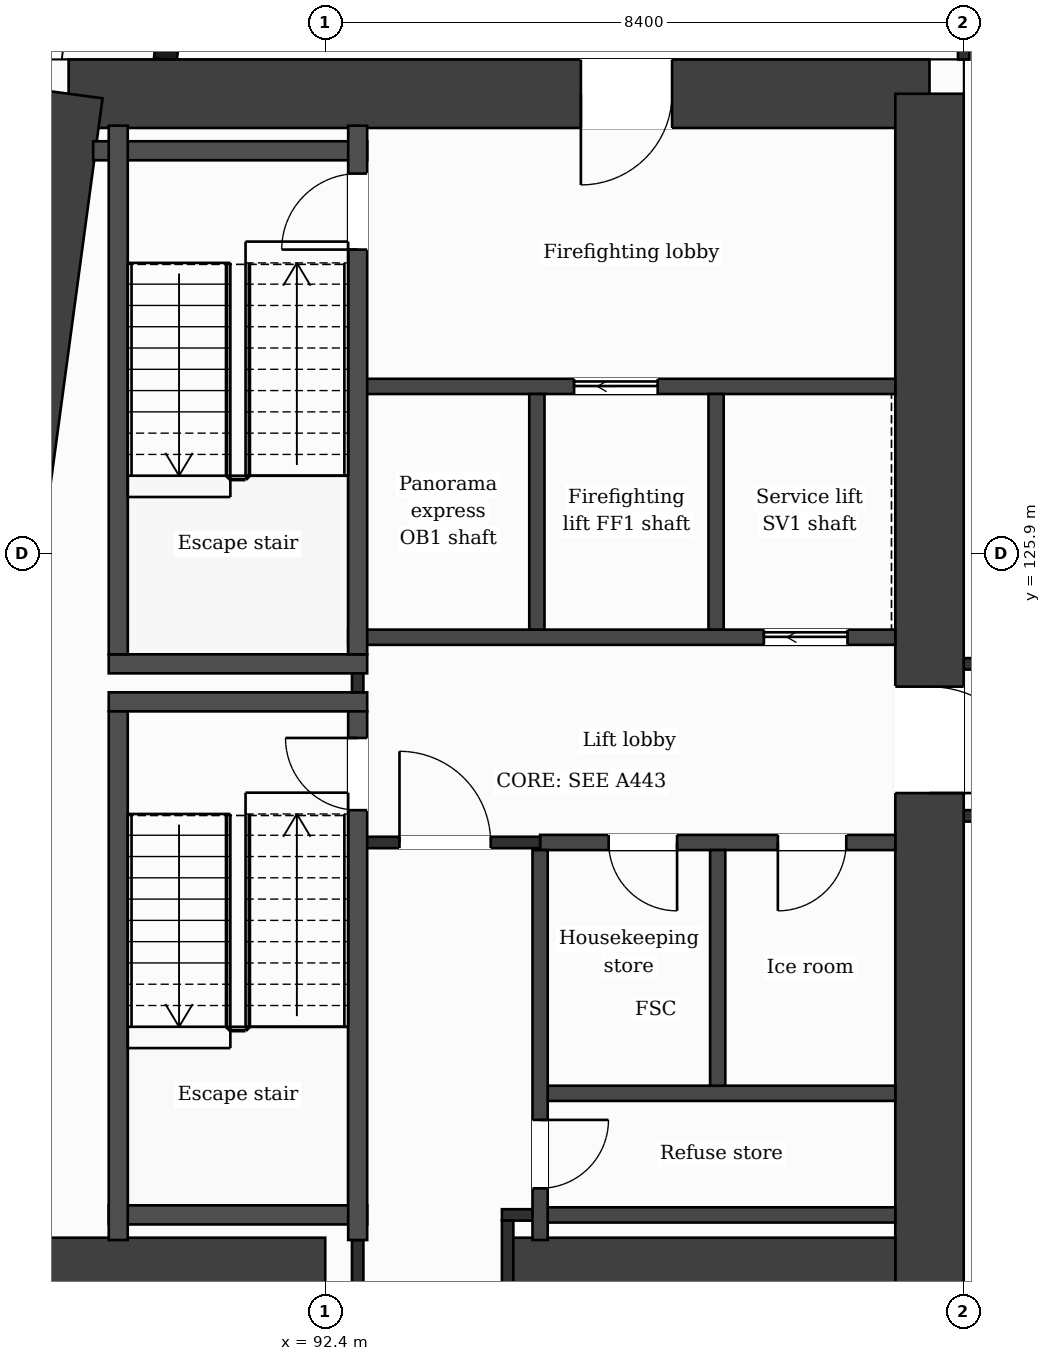
"""IFC4 building model, lengths in metres.
Left out: names, types, materials, properties, quantities, classifications, styles, units other than length and angle.
Written with IfcOpenShell. Run it as: python <this file> out.ifc"""

import sys

from ifc_helpers import new_model, si_unit, direction, frame, frame_2d, origin, place, context, subcontext, project, spatial, rectangle, extrude, element, fill, save


model = new_model("IFC4")
c1 = context("Model", 3, precision=1e-05, world=origin(), true_north=direction((0.0, 1.0)))
c2 = subcontext(c1, "Body", "Model", "MODEL_VIEW")
j1 = project(units=[si_unit("LENGTHUNIT", "METRE"), si_unit("PLANEANGLEUNIT", "RADIAN")], contexts=[c1])
p1 = place(None, origin())
s1 = spatial("IfcSite", under=j1, at=p1, CompositionType="ELEMENT")
p2 = place(p1, origin())
s2 = spatial("IfcBuilding", under=s1, at=p2, CompositionType="ELEMENT")
p3 = place(p2, frame((0.0, 0.0, 177.4)))
s3 = spatial("IfcBuildingStorey", under=s2, at=p3, CompositionType="ELEMENT", Elevation=177.4)
p4 = place(p3, frame((89.024, 131.95, 0.0), z_axis=(0.0, 0.0, 1.0), x_axis=(1.0, 0.0, 0.0)))
e1 = element("IfcWall", 1, at=p4, inside=s3, PredefinedType="SHEAR", context=c2, shape_type="SweptSolid", body=[
    extrude(rectangle(XDim=11.326, YDim=0.9, at=frame_2d((5.663, 0.0))), origin(), (0.0, 0.0, 1.0), 3.7),
])
p5 = place(p4, frame((6.739, 0.0, 0.0)))
e2 = element("IfcOpeningElement", 2, at=p5, cuts=e1, PredefinedType="OPENING", context=c2, shape_type="SweptSolid", body=[
    extrude(rectangle(XDim=1.2, YDim=2.1, at=frame_2d((0.6, 1.05))), frame((0.0, 0.46, 0.0), z_axis=(0.0, -1.0, 0.0), x_axis=(1.0, 0.0, 0.0)), (0.0, 0.0, 1.0), 0.92),
])
p6 = place(p3, frame((100.35, 131.95, 0.0), z_axis=(0.0, 0.0, 1.0), x_axis=(0.0, -1.0, 0.0)))
e3 = element("IfcWall", 3, at=p6, inside=s3, PredefinedType="SHEAR", context=c2, shape_type="SweptSolid", body=[
    extrude(rectangle(XDim=21.1, YDim=0.9, at=frame_2d((10.55, 0.0))), origin(), (0.0, 0.0, 1.0), 3.7),
])
p7 = place(p6, frame((7.8, 0.0, 0.0)))
e4 = element("IfcOpeningElement", 4, at=p7, cuts=e3, PredefinedType="OPENING", context=c2, shape_type="SweptSolid", body=[
    extrude(rectangle(XDim=1.4, YDim=2.1, at=frame_2d((0.7, 1.05))), frame((0.0, 0.46, 0.0), z_axis=(0.0, -1.0, 0.0), x_axis=(1.0, 0.0, 0.0)), (0.0, 0.0, 1.0), 0.92),
])
p8 = place(p3, frame((86.184, 110.85, 0.0), z_axis=(0.0, 0.0, 1.0), x_axis=(0.133410495943, 0.991060865725, 0.0)))
e5 = element("IfcWall", 5, at=p8, inside=s3, PredefinedType="SHEAR", context=c2, shape_type="SweptSolid", body=[
    extrude(rectangle(XDim=21.29, YDim=0.9, at=frame_2d((10.645, 0.0))), origin(), (0.0, 0.0, 1.0), 3.7),
])
p9 = place(p3, frame((87.323, 116.45, 0.0), z_axis=(0.0, 0.0, 1.0), x_axis=(1.0, 0.0, 0.0)))
e6 = element("IfcWall", 6, at=p9, inside=s3, PredefinedType="SHEAR", context=c2, shape_type="SweptSolid", body=[
    extrude(rectangle(XDim=5.077, YDim=0.9, at=frame_2d((2.539, 0.0))), origin(), (0.0, 0.0, 1.0), 3.7),
])
p10 = place(p3, frame((94.8, 116.45, 0.0), z_axis=(0.0, 0.0, 1.0), x_axis=(1.0, 0.0, 0.0)))
e7 = element("IfcWall", 7, at=p10, inside=s3, PredefinedType="SHEAR", context=c2, shape_type="SweptSolid", body=[
    extrude(rectangle(XDim=5.1, YDim=0.9, at=frame_2d((2.55, 0.0))), origin(), (0.0, 0.0, 1.0), 3.7),
])
p11 = place(p3, frame((91.177, 138.95, 0.0), z_axis=(0.0, 0.0, 1.0), x_axis=(-0.133426664613, -0.991058689065, 0.0)))
e8 = element("IfcWall", 8, at=p11, inside=s3, PredefinedType="SOLIDWALL", context=c2, shape_type="SweptSolid", body=[
    extrude(rectangle(XDim=6.609, YDim=0.3, at=frame_2d((3.305, 0.0))), origin(), (0.0, 0.0, 1.0), 3.38),
])
p12 = place(p11, frame((1.039, 0.0, 0.9)))
e9 = element("IfcOpeningElement", 9, at=p12, cuts=e8, PredefinedType="OPENING", context=c2, shape_type="SweptSolid", body=[
    extrude(rectangle(XDim=1.2, YDim=2.1, at=frame_2d((0.6, 1.05))), frame((0.0, 0.16, 0.0), z_axis=(0.0, -1.0, 0.0), x_axis=(1.0, 0.0, 0.0)), (0.0, 0.0, 1.0), 0.32),
])
p13 = place(p11, frame((4.294, 0.0, 0.0)))
e10 = element("IfcOpeningElement", 10, at=p13, cuts=e8, PredefinedType="OPENING", context=c2, shape_type="SweptSolid", body=[
    extrude(rectangle(XDim=1.2, YDim=2.4, at=frame_2d((0.6, 1.2))), frame((0.0, 0.16, 0.0), z_axis=(0.0, -1.0, 0.0), x_axis=(1.0, 0.0, 0.0)), (0.0, 0.0, 1.0), 0.32),
])
p14 = place(p3, frame((95.227, 117.2, 0.0), z_axis=(0.0, 0.0, 1.0), x_axis=(1.0, 0.0, 0.0)))
e11 = element("IfcWall", 11, at=p14, inside=s3, PredefinedType="PARTITIONING", context=c2, shape_type="SweptSolid", body=[
    extrude(rectangle(XDim=4.673, YDim=0.2, at=frame_2d((2.336, 0.0))), origin(), (0.0, 0.0, 1.0), 3.38),
])
p15 = place(p3, frame((94.725, 117.2, 0.0), z_axis=(0.0, 0.0, 1.0), x_axis=(1.0, 0.0, 0.0)))
e12 = element("IfcWall", 12, at=p15, inside=s3, PredefinedType="PARTITIONING", context=c2, shape_type="SweptSolid", body=[
    extrude(rectangle(XDim=0.502, YDim=0.15, at=frame_2d((0.251, 0.0))), origin(), (0.0, 0.0, 1.0), 3.38),
])
p16 = place(p3, frame((89.552, 117.2, 0.0), z_axis=(0.0, 0.0, 1.0), x_axis=(1.0, 0.0, 0.0)))
e13 = element("IfcWall", 13, at=p16, inside=s3, PredefinedType="PARTITIONING", context=c2, shape_type="SweptSolid", body=[
    extrude(rectangle(XDim=3.4, YDim=0.25, at=frame_2d((1.7, 0.0))), origin(), (0.0, 0.0, 1.0), 3.38),
])
p17 = place(p3, frame((95.227, 118.8, 0.0), z_axis=(0.0, 0.0, 1.0), x_axis=(1.0, 0.0, 0.0)))
e14 = element("IfcWall", 14, at=p17, inside=s3, PredefinedType="PARTITIONING", context=c2, shape_type="SweptSolid", body=[
    extrude(rectangle(XDim=4.673, YDim=0.2, at=frame_2d((2.336, 0.0))), origin(), (0.0, 0.0, 1.0), 3.38),
])
p18 = place(p3, frame((95.227, 122.1, 0.0), z_axis=(0.0, 0.0, 1.0), x_axis=(1.0, 0.0, 0.0)))
e15 = element("IfcWall", 15, at=p18, inside=s3, PredefinedType="PARTITIONING", context=c2, shape_type="SweptSolid", body=[
    extrude(rectangle(XDim=4.673, YDim=0.2, at=frame_2d((2.336, 0.0))), origin(), (0.0, 0.0, 1.0), 3.38),
])
p19 = place(p18, frame((0.902, 0.0, 0.0)))
e16 = element("IfcOpeningElement", 16, at=p19, cuts=e15, PredefinedType="OPENING", context=c2, shape_type="SweptSolid", body=[
    extrude(rectangle(XDim=0.9, YDim=2.1, at=frame_2d((0.45, 1.05))), frame((0.0, 0.11, 0.0), z_axis=(0.0, -1.0, 0.0), x_axis=(1.0, 0.0, 0.0)), (0.0, 0.0, 1.0), 0.22),
])
p20 = place(p18, frame((3.128, 0.0, 0.0)))
e17 = element("IfcOpeningElement", 17, at=p20, cuts=e15, PredefinedType="OPENING", context=c2, shape_type="SweptSolid", body=[
    extrude(rectangle(XDim=0.9, YDim=2.1, at=frame_2d((0.45, 1.05))), frame((0.0, 0.11, 0.0), z_axis=(0.0, -1.0, 0.0), x_axis=(1.0, 0.0, 0.0)), (0.0, 0.0, 1.0), 0.22),
])
p21 = place(p3, frame((92.827, 122.1, 0.0), z_axis=(0.0, 0.0, 1.0), x_axis=(1.0, 0.0, 0.0)))
e18 = element("IfcWall", 18, at=p21, inside=s3, PredefinedType="PARTITIONING", context=c2, shape_type="SweptSolid", body=[
    extrude(rectangle(XDim=2.4, YDim=0.15, at=frame_2d((1.2, 0.0))), origin(), (0.0, 0.0, 1.0), 3.38),
])
p22 = place(p21, frame((0.55, 0.0, 0.0)))
e19 = element("IfcOpeningElement", 19, at=p22, cuts=e18, PredefinedType="OPENING", context=c2, shape_type="SweptSolid", body=[
    extrude(rectangle(XDim=1.2, YDim=2.1, at=frame_2d((0.6, 1.05))), frame((0.0, 0.085, 0.0), z_axis=(0.0, -1.0, 0.0), x_axis=(1.0, 0.0, 0.0)), (0.0, 0.0, 1.0), 0.17),
])
p23 = place(p3, frame((100.8, 122.45, 0.0), z_axis=(0.0, 0.0, 1.0), x_axis=(1.0, 0.0, 0.0)))
e20 = element("IfcWall", 20, at=p23, inside=s3, PredefinedType="PARTITIONING", context=c2, shape_type="SweptSolid", body=[
    extrude(rectangle(XDim=25.2, YDim=0.15, at=frame_2d((12.6, 0.0))), origin(), (0.0, 0.0, 1.0), 3.38),
])
for number, where, z_axis, x_axis in (
    (21, (89.552, 123.95, 0.0), (0.0, 0.0, 1.0), (1.0, 0.0, 0.0)),
    (22, (89.552, 124.45, 0.0), (0.0, 0.0, 1.0), (1.0, 0.0, 0.0)),
):
    element("IfcWall", number, at=place(p3, frame(where, z_axis=z_axis, x_axis=x_axis)), inside=s3, PredefinedType="PARTITIONING", context=c2, shape_type="SweptSolid", body=[
        extrude(rectangle(XDim=3.4, YDim=0.25, at=frame_2d((1.7, 0.0))), origin(), (0.0, 0.0, 1.0), 3.38),
    ])
p24 = place(p3, frame((100.8, 124.45, 0.0), z_axis=(0.0, 0.0, 1.0), x_axis=(1.0, 0.0, 0.0)))
e23 = element("IfcWall", 23, at=p24, inside=s3, PredefinedType="PARTITIONING", context=c2, shape_type="SweptSolid", body=[
    extrude(rectangle(XDim=25.2, YDim=0.15, at=frame_2d((12.6, 0.0))), origin(), (0.0, 0.0, 1.0), 3.38),
])
p25 = place(p24, frame((0.975, 0.0, 0.0)))
e24 = element("IfcOpeningElement", 24, at=p25, cuts=e23, PredefinedType="OPENING", context=c2, shape_type="SweptSolid", body=[
    extrude(rectangle(XDim=1.0, YDim=2.1, at=frame_2d((0.5, 1.05))), frame((0.0, 0.085, 0.0), z_axis=(0.0, -1.0, 0.0), x_axis=(1.0, 0.0, 0.0)), (0.0, 0.0, 1.0), 0.17),
])
p26 = place(p24, frame((6.05, 0.0, 0.0)))
e25 = element("IfcOpeningElement", 25, at=p26, cuts=e23, PredefinedType="OPENING", context=c2, shape_type="SweptSolid", body=[
    extrude(rectangle(XDim=1.0, YDim=2.1, at=frame_2d((0.5, 1.05))), frame((0.0, 0.085, 0.0), z_axis=(0.0, -1.0, 0.0), x_axis=(1.0, 0.0, 0.0)), (0.0, 0.0, 1.0), 0.17),
])
p27 = place(p24, frame((9.27, 0.0, 0.0)))
e26 = element("IfcOpeningElement", 26, at=p27, cuts=e23, PredefinedType="OPENING", context=c2, shape_type="SweptSolid", body=[
    extrude(rectangle(XDim=1.0, YDim=2.1, at=frame_2d((0.5, 1.05))), frame((0.0, 0.085, 0.0), z_axis=(0.0, -1.0, 0.0), x_axis=(1.0, 0.0, 0.0)), (0.0, 0.0, 1.0), 0.17),
])
p28 = place(p24, frame((14.2, 0.0, 0.0)))
e27 = element("IfcOpeningElement", 27, at=p28, cuts=e23, PredefinedType="OPENING", context=c2, shape_type="SweptSolid", body=[
    extrude(rectangle(XDim=1.0, YDim=2.1, at=frame_2d((0.5, 1.05))), frame((0.0, 0.085, 0.0), z_axis=(0.0, -1.0, 0.0), x_axis=(1.0, 0.0, 0.0)), (0.0, 0.0, 1.0), 0.17),
])
p29 = place(p24, frame((18.825, 0.0, 0.0)))
e28 = element("IfcOpeningElement", 28, at=p29, cuts=e23, PredefinedType="OPENING", context=c2, shape_type="SweptSolid", body=[
    extrude(rectangle(XDim=1.0, YDim=2.1, at=frame_2d((0.5, 1.05))), frame((0.0, 0.085, 0.0), z_axis=(0.0, -1.0, 0.0), x_axis=(1.0, 0.0, 0.0)), (0.0, 0.0, 1.0), 0.17),
])
p30 = place(p3, frame((92.702, 124.8, 0.0), z_axis=(0.0, 0.0, 1.0), x_axis=(1.0, 0.0, 0.0)))
e29 = element("IfcWall", 29, at=p30, inside=s3, PredefinedType="PARTITIONING", context=c2, shape_type="SweptSolid", body=[
    extrude(rectangle(XDim=7.198, YDim=0.2, at=frame_2d((3.599, 0.0))), origin(), (0.0, 0.0, 1.0), 3.38),
])
p31 = place(p30, frame((5.469, 0.0, 0.0)))
e30 = element("IfcOpeningElement", 30, at=p31, cuts=e29, PredefinedType="OPENING", context=c2, shape_type="SweptSolid", body=[
    extrude(rectangle(XDim=1.1, YDim=2.1, at=frame_2d((0.55, 1.05))), frame((0.0, 0.11, 0.0), z_axis=(0.0, -1.0, 0.0), x_axis=(1.0, 0.0, 0.0)), (0.0, 0.0, 1.0), 0.22),
])
p32 = place(p3, frame((92.827, 128.1, 0.0), z_axis=(0.0, 0.0, 1.0), x_axis=(1.0, 0.0, 0.0)))
e31 = element("IfcWall", 31, at=p32, inside=s3, PredefinedType="PARTITIONING", context=c2, shape_type="SweptSolid", body=[
    extrude(rectangle(XDim=7.073, YDim=0.2, at=frame_2d((3.537, 0.0))), origin(), (0.0, 0.0, 1.0), 3.38),
])
p33 = place(p32, frame((2.847, 0.0, 0.0)))
e32 = element("IfcOpeningElement", 32, at=p33, cuts=e31, PredefinedType="OPENING", context=c2, shape_type="SweptSolid", body=[
    extrude(rectangle(XDim=1.1, YDim=2.1, at=frame_2d((0.55, 1.05))), frame((0.0, 0.11, 0.0), z_axis=(0.0, -1.0, 0.0), x_axis=(1.0, 0.0, 0.0)), (0.0, 0.0, 1.0), 0.22),
])
p34 = place(p3, frame((89.347, 131.2, 0.0), z_axis=(0.0, 0.0, 1.0), x_axis=(1.0, 0.0, 0.0)))
e33 = element("IfcWall", 33, at=p34, inside=s3, PredefinedType="PARTITIONING", context=c2, shape_type="SweptSolid", body=[
    extrude(rectangle(XDim=3.604, YDim=0.25, at=frame_2d((1.802, 0.0))), origin(), (0.0, 0.0, 1.0), 3.38),
])
p35 = place(p3, frame((89.677, 116.87, 0.0), z_axis=(0.0, 0.0, 1.0), x_axis=(0.0, 1.0, 0.0)))
e34 = element("IfcWall", 34, at=p35, inside=s3, PredefinedType="PARTITIONING", context=c2, shape_type="SweptSolid", body=[
    extrude(rectangle(XDim=6.955, YDim=0.25, at=frame_2d((3.478, 0.0))), origin(), (0.0, 0.0, 1.0), 3.38),
])
p36 = place(p3, frame((89.677, 124.575, 0.0), z_axis=(0.0, 0.0, 1.0), x_axis=(0.0, 1.0, 0.0)))
e35 = element("IfcWall", 35, at=p36, inside=s3, PredefinedType="PARTITIONING", context=c2, shape_type="SweptSolid", body=[
    extrude(rectangle(XDim=6.955, YDim=0.25, at=frame_2d((3.478, 0.0))), origin(), (0.0, 0.0, 1.0), 3.38),
])
p37 = place(p3, frame((92.827, 116.0, 0.0), z_axis=(0.0, 0.0, 1.0), x_axis=(0.0, 1.0, 0.0)))
e36 = element("IfcWall", 36, at=p37, inside=s3, PredefinedType="PARTITIONING", context=c2, shape_type="SweptSolid", body=[
    extrude(rectangle(XDim=0.87, YDim=0.15, at=frame_2d((0.435, 0.0))), origin(), (0.0, 0.0, 1.0), 3.38),
])
p38 = place(p3, frame((92.827, 124.075, 0.0), z_axis=(0.0, 0.0, 1.0), x_axis=(0.0, 1.0, 0.0)))
e37 = element("IfcWall", 37, at=p38, inside=s3, PredefinedType="PARTITIONING", context=c2, shape_type="SweptSolid", body=[
    extrude(rectangle(XDim=0.25, YDim=0.15, at=frame_2d((0.125, 0.0))), origin(), (0.0, 0.0, 1.0), 3.38),
])
p39 = place(p3, frame((92.827, 116.87, 0.0), z_axis=(0.0, 0.0, 1.0), x_axis=(0.0, 1.0, 0.0)))
e38 = element("IfcWall", 38, at=p39, inside=s3, PredefinedType="PARTITIONING", context=c2, shape_type="SweptSolid", body=[
    extrude(rectangle(XDim=6.955, YDim=0.25, at=frame_2d((3.478, 0.0))), origin(), (0.0, 0.0, 1.0), 3.38),
])
p40 = place(p39, frame((5.655, 0.0, 0.0)))
e39 = element("IfcOpeningElement", 39, at=p40, cuts=e38, PredefinedType="OPENING", context=c2, shape_type="SweptSolid", body=[
    extrude(rectangle(XDim=0.95, YDim=2.1, at=frame_2d((0.475, 1.05))), frame((0.0, 0.135, 0.0), z_axis=(0.0, -1.0, 0.0), x_axis=(1.0, 0.0, 0.0)), (0.0, 0.0, 1.0), 0.27),
])
p41 = place(p3, frame((92.827, 124.575, 0.0), z_axis=(0.0, 0.0, 1.0), x_axis=(0.0, 1.0, 0.0)))
e40 = element("IfcWall", 40, at=p41, inside=s3, PredefinedType="PARTITIONING", context=c2, shape_type="SweptSolid", body=[
    extrude(rectangle(XDim=6.955, YDim=0.25, at=frame_2d((3.478, 0.0))), origin(), (0.0, 0.0, 1.0), 3.38),
])
p42 = place(p41, frame((5.325, 0.0, 0.0)))
e41 = element("IfcOpeningElement", 41, at=p42, cuts=e40, PredefinedType="OPENING", context=c2, shape_type="SweptSolid", body=[
    extrude(rectangle(XDim=1.0, YDim=2.1, at=frame_2d((0.5, 1.05))), frame((0.0, 0.135, 0.0), z_axis=(0.0, -1.0, 0.0), x_axis=(1.0, 0.0, 0.0)), (0.0, 0.0, 1.0), 0.27),
])
p43 = place(p3, frame((94.8, 116.0, 0.0), z_axis=(0.0, 0.0, 1.0), x_axis=(0.0, 1.0, 0.0)))
e42 = element("IfcWall", 42, at=p43, inside=s3, PredefinedType="PARTITIONING", context=c2, shape_type="SweptSolid", body=[
    extrude(rectangle(XDim=1.125, YDim=0.15, at=frame_2d((0.562, 0.0))), origin(), (0.0, 0.0, 1.0), 3.38),
])
p44 = place(p3, frame((95.185, 124.9, 0.0), z_axis=(0.0, 0.0, 1.0), x_axis=(0.0, 1.0, 0.0)))
e43 = element("IfcWall", 43, at=p44, inside=s3, PredefinedType="PARTITIONING", context=c2, shape_type="SweptSolid", body=[
    extrude(rectangle(XDim=3.1, YDim=0.2, at=frame_2d((1.55, 0.0))), origin(), (0.0, 0.0, 1.0), 3.38),
])
p45 = place(p3, frame((95.227, 116.87, 0.0), z_axis=(0.0, 0.0, 1.0), x_axis=(0.0, 1.0, 0.0)))
e44 = element("IfcWall", 44, at=p45, inside=s3, PredefinedType="PARTITIONING", context=c2, shape_type="SweptSolid", body=[
    extrude(rectangle(XDim=5.13, YDim=0.2, at=frame_2d((2.565, 0.0))), origin(), (0.0, 0.0, 1.0), 3.38),
])
p46 = place(p45, frame((0.68, 0.0, 0.0)))
e45 = element("IfcOpeningElement", 45, at=p46, cuts=e44, PredefinedType="OPENING", context=c2, shape_type="SweptSolid", body=[
    extrude(rectangle(XDim=0.9, YDim=2.1, at=frame_2d((0.45, 1.05))), frame((0.0, 0.11, 0.0), z_axis=(0.0, -1.0, 0.0), x_axis=(1.0, 0.0, 0.0)), (0.0, 0.0, 1.0), 0.22),
])
for number, where, z_axis, x_axis in (
    (46, (97.542, 124.9, 0.0), (0.0, 0.0, 1.0), (0.0, 1.0, 0.0)),
    (47, (97.563, 118.9, 0.0), (0.0, 0.0, 1.0), (0.0, 1.0, 0.0)),
):
    element("IfcWall", number, at=place(p3, frame(where, z_axis=z_axis, x_axis=x_axis)), inside=s3, PredefinedType="PARTITIONING", context=c2, shape_type="SweptSolid", body=[
        extrude(rectangle(XDim=3.1, YDim=0.2, at=frame_2d((1.55, 0.0))), origin(), (0.0, 0.0, 1.0), 3.38),
    ])
p47 = place(p3, frame((100.8, 132.4, 0.0), z_axis=(0.0, 0.0, 1.0), x_axis=(0.0, 1.0, 0.0)))
e48 = element("IfcWall", 48, at=p47, inside=s3, PredefinedType="PARTITIONING", context=c2, shape_type="SweptSolid", body=[
    extrude(rectangle(XDim=1.325, YDim=0.15, at=frame_2d((0.663, 0.0))), origin(), (0.0, 0.0, 1.0), 3.38),
])
p48 = place(p22, origin())
e49 = element("IfcDoor", 49, at=p48, inside=s3, OperationType="SINGLE_SWING_LEFT", PredefinedType="DOOR", context=c2, shape_type="SweptSolid", body=[
    extrude(rectangle(XDim=1.2, YDim=2.1, at=frame_2d((0.6, 1.05))), frame((0.0, 0.025, 0.0), z_axis=(0.0, -1.0, 0.0), x_axis=(1.0, 0.0, 0.0)), (0.0, 0.0, 1.0), 0.05),
])
fill(e19, e49)
p49 = place(p33, origin())
e50 = element("IfcDoor", 50, at=p49, inside=s3, OperationType="SLIDING_TO_LEFT", PredefinedType="DOOR", context=c2, shape_type="SweptSolid", body=[
    extrude(rectangle(XDim=1.1, YDim=2.1, at=frame_2d((0.55, 1.05))), frame((0.0, 0.025, 0.0), z_axis=(0.0, -1.0, 0.0), x_axis=(1.0, 0.0, 0.0)), (0.0, 0.0, 1.0), 0.05),
])
fill(e32, e50)
p50 = place(p31, origin())
e51 = element("IfcDoor", 51, at=p50, inside=s3, OperationType="SLIDING_TO_LEFT", PredefinedType="DOOR", context=c2, shape_type="SweptSolid", body=[
    extrude(rectangle(XDim=1.1, YDim=2.1, at=frame_2d((0.55, 1.05))), frame((0.0, 0.025, 0.0), z_axis=(0.0, -1.0, 0.0), x_axis=(1.0, 0.0, 0.0)), (0.0, 0.0, 1.0), 0.05),
])
fill(e30, e51)
p51 = place(p19, origin())
e52 = element("IfcDoor", 52, at=p51, inside=s3, OperationType="SINGLE_SWING_RIGHT", PredefinedType="DOOR", context=c2, shape_type="SweptSolid", body=[
    extrude(rectangle(XDim=0.9, YDim=2.1, at=frame_2d((0.45, 1.05))), frame((0.0, 0.025, 0.0), z_axis=(0.0, -1.0, 0.0), x_axis=(1.0, 0.0, 0.0)), (0.0, 0.0, 1.0), 0.05),
])
fill(e16, e52)
p52 = place(p20, origin())
e53 = element("IfcDoor", 53, at=p52, inside=s3, OperationType="SINGLE_SWING_LEFT", PredefinedType="DOOR", context=c2, shape_type="SweptSolid", body=[
    extrude(rectangle(XDim=0.9, YDim=2.1, at=frame_2d((0.45, 1.05))), frame((0.0, 0.025, 0.0), z_axis=(0.0, -1.0, 0.0), x_axis=(1.0, 0.0, 0.0)), (0.0, 0.0, 1.0), 0.05),
])
fill(e17, e53)
p53 = place(p40, origin())
e54 = element("IfcDoor", 54, at=p53, inside=s3, OperationType="SINGLE_SWING_RIGHT", PredefinedType="DOOR", context=c2, shape_type="SweptSolid", body=[
    extrude(rectangle(XDim=0.95, YDim=2.1, at=frame_2d((0.475, 1.05))), frame((0.0, 0.025, 0.0), z_axis=(0.0, -1.0, 0.0), x_axis=(1.0, 0.0, 0.0)), (0.0, 0.0, 1.0), 0.05),
])
fill(e39, e54)
p54 = place(p42, origin())
e55 = element("IfcDoor", 55, at=p54, inside=s3, OperationType="SINGLE_SWING_LEFT", PredefinedType="DOOR", context=c2, shape_type="SweptSolid", body=[
    extrude(rectangle(XDim=1.0, YDim=2.1, at=frame_2d((0.5, 1.05))), frame((0.0, 0.025, 0.0), z_axis=(0.0, -1.0, 0.0), x_axis=(1.0, 0.0, 0.0)), (0.0, 0.0, 1.0), 0.05),
])
fill(e41, e55)
p55 = place(p46, origin())
e56 = element("IfcDoor", 56, at=p55, inside=s3, OperationType="SINGLE_SWING_RIGHT", PredefinedType="DOOR", context=c2, shape_type="SweptSolid", body=[
    extrude(rectangle(XDim=0.9, YDim=2.1, at=frame_2d((0.45, 1.05))), frame((0.0, 0.025, 0.0), z_axis=(0.0, -1.0, 0.0), x_axis=(1.0, 0.0, 0.0)), (0.0, 0.0, 1.0), 0.05),
])
fill(e45, e56)
p56 = place(p5, origin())
e57 = element("IfcDoor", 57, at=p56, inside=s3, OperationType="SINGLE_SWING_LEFT", PredefinedType="DOOR", context=c2, shape_type="SweptSolid", body=[
    extrude(rectangle(XDim=1.2, YDim=2.1, at=frame_2d((0.6, 1.05))), frame((0.0, 0.025, 0.0), z_axis=(0.0, -1.0, 0.0), x_axis=(1.0, 0.0, 0.0)), (0.0, 0.0, 1.0), 0.05),
])
fill(e2, e57)
p57 = place(p7, origin())
e58 = element("IfcDoor", 58, at=p57, inside=s3, OperationType="SINGLE_SWING_RIGHT", PredefinedType="DOOR", context=c2, shape_type="SweptSolid", body=[
    extrude(rectangle(XDim=1.4, YDim=2.1, at=frame_2d((0.7, 1.05))), frame((0.0, 0.025, 0.0), z_axis=(0.0, -1.0, 0.0), x_axis=(1.0, 0.0, 0.0)), (0.0, 0.0, 1.0), 0.05),
])
fill(e4, e58)
save(model, sys.argv[1])
